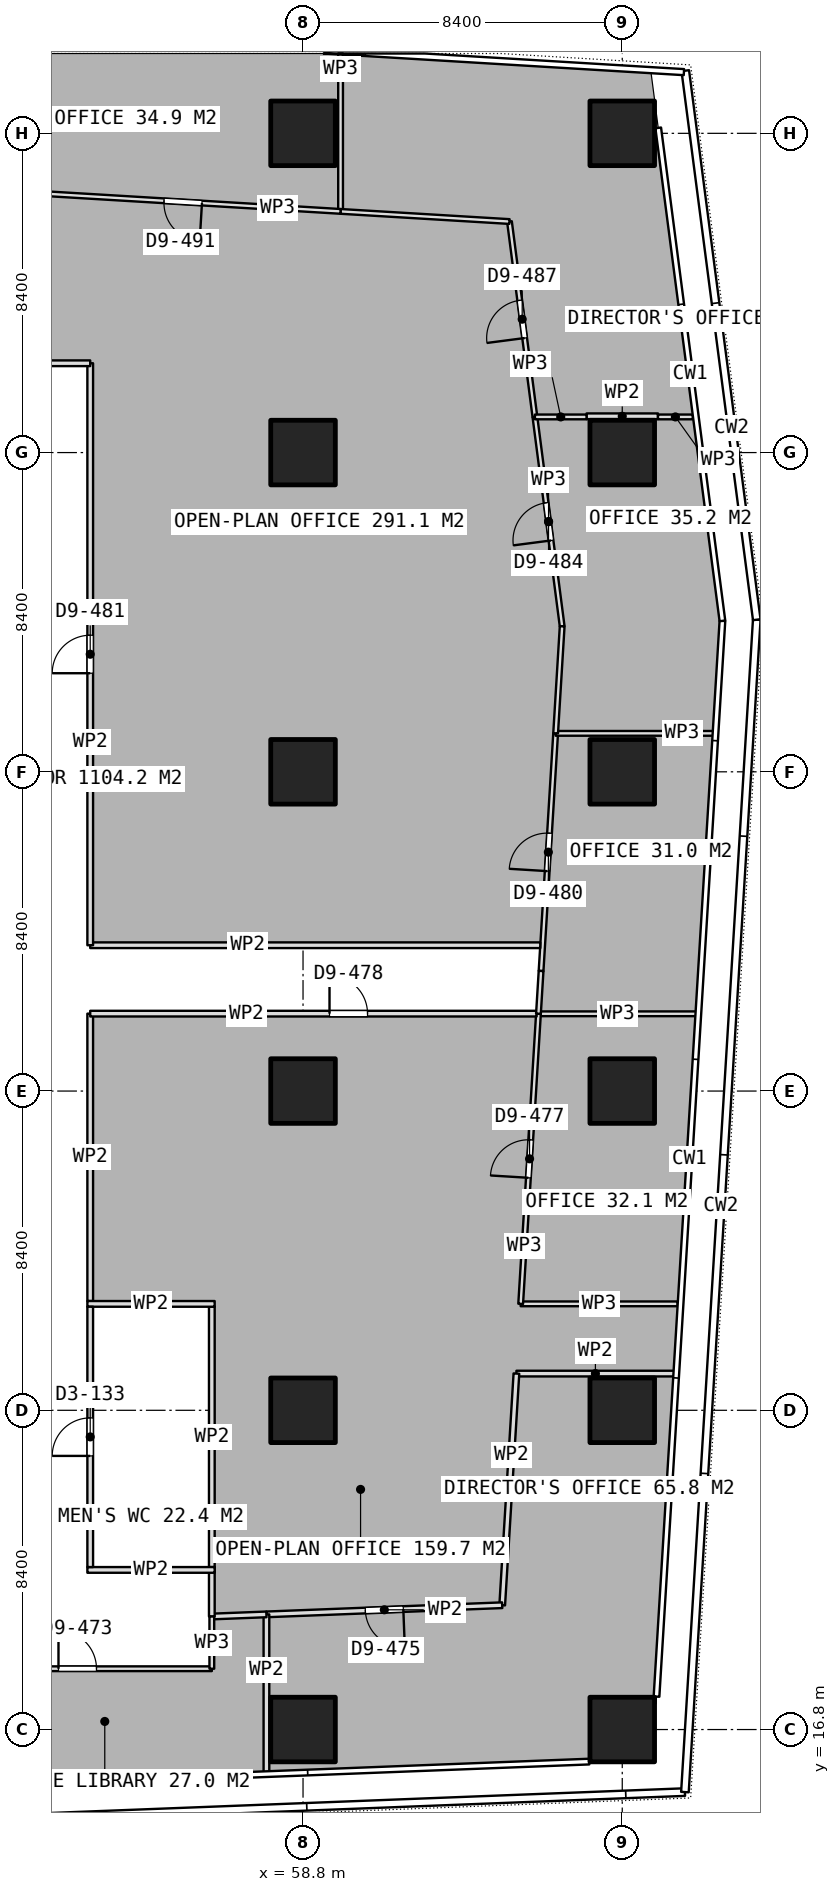
"""IFC4 building model, lengths in metres.
Left out: names, types, materials, properties, quantities, classifications, styles, units other than length and angle.
Written with IfcOpenShell. Run it as: python <this file> out.ifc"""

import sys

from ifc_helpers import new_model, si_unit, direction, frame, frame_2d, origin, origin_2d, place, context, subcontext, project, spatial, rectangle, extrude, element, fill, save


model = new_model("IFC4")
c1 = context("Model", 3, precision=1e-05, world=origin(), true_north=direction((0.0, 1.0)))
c2 = subcontext(c1, "Body", "Model", "MODEL_VIEW")
j1 = project(units=[si_unit("LENGTHUNIT", "METRE"), si_unit("PLANEANGLEUNIT", "RADIAN")], contexts=[c1])
p1 = place(None, origin())
s1 = spatial("IfcSite", under=j1, at=p1, CompositionType="ELEMENT")
p2 = place(p1, origin())
s2 = spatial("IfcBuilding", under=s1, at=p2, CompositionType="ELEMENT")
p3 = place(p2, frame((0.0, 0.0, 125.3)))
s3 = spatial("IfcBuildingStorey", under=s2, at=p3, CompositionType="ELEMENT", Elevation=125.3)
for number, where, z_axis, x_axis in (
    (1, (58.8, 16.8, 0.0), (0.0, 0.0, 1.0), (1.0, 0.0, 0.0)),
    (2, (58.8, 25.2, 0.0), (0.0, 0.0, 1.0), (1.0, 0.0, 0.0)),
    (3, (58.8, 33.6, 0.0), (0.0, 0.0, 1.0), (1.0, 0.0, 0.0)),
    (4, (58.8, 42.0, 0.0), (0.0, 0.0, 1.0), (1.0, 0.0, 0.0)),
    (5, (58.8, 50.4, 0.0), (0.0, 0.0, 1.0), (1.0, 0.0, 0.0)),
    (6, (58.8, 58.8, 0.0), (0.0, 0.0, 1.0), (1.0, 0.0, 0.0)),
    (7, (67.2, 16.8, 0.0), (0.0, 0.0, 1.0), (1.0, 0.0, 0.0)),
    (8, (67.2, 25.2, 0.0), (0.0, 0.0, 1.0), (1.0, 0.0, 0.0)),
    (9, (67.2, 33.6, 0.0), (0.0, 0.0, 1.0), (1.0, 0.0, 0.0)),
    (10, (67.2, 42.0, 0.0), (0.0, 0.0, 1.0), (1.0, 0.0, 0.0)),
    (11, (67.2, 50.4, 0.0), (0.0, 0.0, 1.0), (1.0, 0.0, 0.0)),
    (12, (67.2, 58.8, 0.0), (0.0, 0.0, 1.0), (1.0, 0.0, 0.0)),
):
    element("IfcColumn", number, at=place(p3, frame(where, z_axis=z_axis, x_axis=x_axis)), inside=s3, PredefinedType="COLUMN", context=c2, shape_type="SweptSolid", body=[
        extrude(rectangle(XDim=1.7, YDim=1.7, at=origin_2d()), origin(), (0.0, 0.0, 1.0), 3.75),
    ])
for number, where, z_axis, x_axis in (
    (13, (53.125, 21.0, 0.0), (0.0, 0.0, 1.0), (1.0, 0.0, 0.0)),
    (14, (53.125, 28.0, 0.0), (0.0, 0.0, 1.0), (1.0, 0.0, 0.0)),
):
    element("IfcWall", number, at=place(p3, frame(where, z_axis=z_axis, x_axis=x_axis)), inside=s3, PredefinedType="PARTITIONING", context=c2, shape_type="SweptSolid", body=[
        extrude(rectangle(XDim=3.35, YDim=0.15, at=frame_2d((1.675, 0.0))), origin(), (0.0, 0.0, 1.0), 3.5),
    ])
p4 = place(p3, frame((53.2, 21.075, 0.0), z_axis=(0.0, 0.0, 1.0), x_axis=(0.0, 1.0, 0.0)))
e15 = element("IfcWall", 15, at=p4, inside=s3, PredefinedType="PARTITIONING", context=c2, shape_type="SweptSolid", body=[
    extrude(rectangle(XDim=6.85, YDim=0.15, at=frame_2d((3.425, 0.0))), origin(), (0.0, 0.0, 1.0), 3.5),
])
p5 = place(p4, frame((2.925, 0.0, 0.0)))
e16 = element("IfcOpeningElement", 16, at=p5, cuts=e15, PredefinedType="OPENING", context=c2, shape_type="SweptSolid", body=[
    extrude(rectangle(XDim=1.0, YDim=2.1, at=frame_2d((0.5, 1.05))), frame((0.0, 0.085, 0.0), z_axis=(0.0, -1.0, 0.0), x_axis=(1.0, 0.0, 0.0)), (0.0, 0.0, 1.0), 0.17),
])
p6 = place(p3, frame((56.4, 21.075, 0.0), z_axis=(0.0, 0.0, 1.0), x_axis=(0.0, 1.0, 0.0)))
e17 = element("IfcWall", 17, at=p6, inside=s3, PredefinedType="PARTITIONING", context=c2, shape_type="SweptSolid", body=[
    extrude(rectangle(XDim=6.85, YDim=0.15, at=frame_2d((3.425, 0.0))), origin(), (0.0, 0.0, 1.0), 3.5),
])
p7 = place(p3, frame((64.995, 35.633, 0.0), z_axis=(0.0, 0.0, 1.0), x_axis=(1.0, 0.0, 0.0)))
e18 = element("IfcWall", 18, at=p7, inside=s3, PredefinedType="PARTITIONING", context=c2, shape_type="SweptSolid", body=[
    extrude(rectangle(XDim=4.157, YDim=0.125, at=frame_2d((2.079, 0.0))), origin(), (0.0, 0.0, 1.0), 3.5),
])
p8 = place(p3, frame((68.655, 28.001, 0.0), z_axis=(0.0, 0.0, 1.0), x_axis=(-1.0, 0.0, 0.0)))
e19 = element("IfcWall", 19, at=p8, inside=s3, PredefinedType="PARTITIONING", context=c2, shape_type="SweptSolid", body=[
    extrude(rectangle(XDim=4.128, YDim=0.125, at=frame_2d((2.064, 0.0))), origin(), (0.0, 0.0, 1.0), 3.5),
])
p9 = place(p3, frame((64.527, 28.001, 0.0), z_axis=(0.0, 0.0, 1.0), x_axis=(0.061207439092, 0.998125067013, 0.0)))
e20 = element("IfcWall", 20, at=p9, inside=s3, PredefinedType="PARTITIONING", context=c2, shape_type="SweptSolid", body=[
    extrude(rectangle(XDim=7.646, YDim=0.125, at=frame_2d((3.823, 0.0))), origin(), (0.0, 0.0, 1.0), 3.5),
])
p10 = place(p9, frame((3.323, 0.0, 0.0)))
e21 = element("IfcOpeningElement", 21, at=p10, cuts=e20, PredefinedType="OPENING", context=c2, shape_type="SweptSolid", body=[
    extrude(rectangle(XDim=1.0, YDim=2.1, at=frame_2d((0.5, 1.05))), frame((0.0, 0.073, 0.0), z_axis=(0.0, -1.0, 0.0), x_axis=(1.0, 0.0, 0.0)), (0.0, 0.0, 1.0), 0.145),
])
p11 = place(p3, frame((65.064, 36.76, 0.0), z_axis=(0.0, 0.0, 1.0), x_axis=(0.061155234725, 0.998128266941, 0.0)))
e22 = element("IfcWall", 22, at=p11, inside=s3, PredefinedType="PARTITIONING", context=c2, shape_type="SweptSolid", body=[
    extrude(rectangle(XDim=6.264, YDim=0.125, at=frame_2d((3.132, 0.0))), origin(), (0.0, 0.0, 1.0), 3.5),
])
p12 = place(p11, frame((2.632, 0.0, 0.0)))
e23 = element("IfcOpeningElement", 23, at=p12, cuts=e22, PredefinedType="OPENING", context=c2, shape_type="SweptSolid", body=[
    extrude(rectangle(XDim=1.0, YDim=2.1, at=frame_2d((0.5, 1.05))), frame((0.0, 0.073, 0.0), z_axis=(0.0, -1.0, 0.0), x_axis=(1.0, 0.0, 0.0)), (0.0, 0.0, 1.0), 0.145),
])
p13 = place(p3, frame((65.447, 43.012, 0.0), z_axis=(0.0, 0.0, 1.0), x_axis=(1.0, 0.0, 0.0)))
e24 = element("IfcWall", 24, at=p13, inside=s3, PredefinedType="PARTITIONING", context=c2, shape_type="SweptSolid", body=[
    extrude(rectangle(XDim=4.157, YDim=0.125, at=frame_2d((2.079, 0.0))), origin(), (0.0, 0.0, 1.0), 3.5),
])
p14 = place(p3, frame((64.995, 35.634, 0.0), z_axis=(0.0, 0.0, 1.0), x_axis=(0.061030858212, 0.998135879701, 0.0)))
e25 = element("IfcWall", 25, at=p14, inside=s3, PredefinedType="PARTITIONING", context=c2, shape_type="SweptSolid", body=[
    extrude(rectangle(XDim=1.128, YDim=0.125, at=frame_2d((0.564, 0.0))), origin(), (0.0, 0.0, 1.0), 3.5),
])
p15 = place(p3, frame((64.902, 51.338, 0.0), z_axis=(0.0, 0.0, 1.0), x_axis=(1.0, 0.0, 0.0)))
e26 = element("IfcWall", 26, at=p15, inside=s3, PredefinedType="PARTITIONING", context=c2, shape_type="SweptSolid", body=[
    extrude(rectangle(XDim=1.358, YDim=0.125, at=frame_2d((0.679, 0.0))), origin(), (0.0, 0.0, 1.0), 3.5),
])
p16 = place(p3, frame((68.14, 51.338, 0.0), z_axis=(0.0, 0.0, 1.0), x_axis=(1.0, 0.0, 0.0)))
e27 = element("IfcWall", 27, at=p16, inside=s3, PredefinedType="PARTITIONING", context=c2, shape_type="SweptSolid", body=[
    extrude(rectangle(XDim=0.917, YDim=0.125, at=frame_2d((0.458, 0.0))), origin(), (0.0, 0.0, 1.0), 3.5),
])
p17 = place(p3, frame((65.447, 43.013, 0.0), z_axis=(0.0, 0.0, 1.0), x_axis=(0.060944611384, 0.998141149509, 0.0)))
e28 = element("IfcWall", 28, at=p17, inside=s3, PredefinedType="PARTITIONING", context=c2, shape_type="SweptSolid", body=[
    extrude(rectangle(XDim=2.82, YDim=0.125, at=frame_2d((1.41, 0.0))), origin(), (0.0, 0.0, 1.0), 3.5),
])
p18 = place(p3, frame((65.619, 45.828, 0.0), z_axis=(0.0, 0.0, 1.0), x_axis=(-0.129002942223, 0.991644210843, 0.0)))
e29 = element("IfcWall", 29, at=p18, inside=s3, PredefinedType="PARTITIONING", context=c2, shape_type="SweptSolid", body=[
    extrude(rectangle(XDim=5.556, YDim=0.125, at=frame_2d((2.778, 0.0))), origin(), (0.0, 0.0, 1.0), 3.5),
])
p19 = place(p18, frame((2.278, 0.0, 0.0)))
e30 = element("IfcOpeningElement", 30, at=p19, cuts=e29, PredefinedType="OPENING", context=c2, shape_type="SweptSolid", body=[
    extrude(rectangle(XDim=1.0, YDim=2.1, at=frame_2d((0.5, 1.05))), frame((0.0, 0.073, 0.0), z_axis=(0.0, -1.0, 0.0), x_axis=(1.0, 0.0, 0.0)), (0.0, 0.0, 1.0), 0.145),
])
p20 = place(p3, frame((59.788, 56.746, 0.0), z_axis=(0.0, 0.0, 1.0), x_axis=(0.0, 1.0, 0.0)))
e31 = element("IfcWall", 31, at=p20, inside=s3, PredefinedType="PARTITIONING", context=c2, shape_type="SweptSolid", body=[
    extrude(rectangle(XDim=4.157, YDim=0.125, at=frame_2d((2.079, 0.0))), origin(), (0.0, 0.0, 1.0), 3.5),
])
p21 = place(p3, frame((64.902, 51.339, 0.0), z_axis=(0.0, 0.0, 1.0), x_axis=(-0.129290857756, 0.991606713421, 0.0)))
e32 = element("IfcWall", 32, at=p21, inside=s3, PredefinedType="PARTITIONING", context=c2, shape_type="SweptSolid", body=[
    extrude(rectangle(XDim=5.183, YDim=0.125, at=frame_2d((2.592, 0.0))), origin(), (0.0, 0.0, 1.0), 3.5),
])
p22 = place(p21, frame((2.092, 0.0, 0.0)))
e33 = element("IfcOpeningElement", 33, at=p22, cuts=e32, PredefinedType="OPENING", context=c2, shape_type="SweptSolid", body=[
    extrude(rectangle(XDim=1.0, YDim=2.1, at=frame_2d((0.5, 1.05))), frame((0.0, 0.073, 0.0), z_axis=(0.0, -1.0, 0.0), x_axis=(1.0, 0.0, 0.0)), (0.0, 0.0, 1.0), 0.145),
])
p23 = place(p3, frame((64.232, 56.479, 0.0), z_axis=(0.0, 0.0, 1.0), x_axis=(-0.998198676411, 0.059995019888, 0.0)))
e34 = element("IfcWall", 34, at=p23, inside=s3, PredefinedType="PARTITIONING", context=c2, shape_type="SweptSolid", body=[
    extrude(rectangle(XDim=4.452, YDim=0.125, at=frame_2d((2.226, 0.0))), origin(), (0.0, 0.0, 1.0), 3.5),
])
p24 = place(p3, frame((59.787, 56.746, 0.0), z_axis=(0.0, 0.0, 1.0), x_axis=(-0.99820280668, 0.05992626083, 0.0)))
e35 = element("IfcWall", 35, at=p24, inside=s3, PredefinedType="PARTITIONING", context=c2, shape_type="SweptSolid", body=[
    extrude(rectangle(XDim=8.307, YDim=0.125, at=frame_2d((4.153, 0.0))), origin(), (0.0, 0.0, 1.0), 3.5),
])
p25 = place(p24, frame((3.653, 0.0, 0.0)))
e36 = element("IfcOpeningElement", 36, at=p25, cuts=e35, PredefinedType="OPENING", context=c2, shape_type="SweptSolid", body=[
    extrude(rectangle(XDim=1.0, YDim=2.1, at=frame_2d((0.5, 1.05))), frame((0.0, 0.073, 0.0), z_axis=(0.0, -1.0, 0.0), x_axis=(1.0, 0.0, 0.0)), (0.0, 0.0, 1.0), 0.145),
])
p26 = place(p3, frame((66.26, 51.355, 0.0), z_axis=(0.0, 0.0, 1.0), x_axis=(1.0, 0.0, 0.0)))
e37 = element("IfcWall", 37, at=p26, inside=s3, PredefinedType="PARTITIONING", context=c2, shape_type="SweptSolid", body=[
    extrude(rectangle(XDim=1.88, YDim=0.15, at=frame_2d((0.94, 0.0))), origin(), (0.0, 0.0, 1.0), 3.5),
])
p27 = place(p3, frame((65.043, 37.437, 0.0), z_axis=(0.0, 0.0, 1.0), x_axis=(-1.0, 0.0, 0.0)))
e38 = element("IfcWall", 38, at=p27, inside=s3, PredefinedType="PARTITIONING", context=c2, shape_type="SweptSolid", body=[
    extrude(rectangle(XDim=11.843, YDim=0.15, at=frame_2d((5.921, 0.0))), origin(), (0.0, 0.0, 1.0), 3.5),
])
p28 = place(p3, frame((53.2, 37.437, 0.0), z_axis=(0.0, 0.0, 1.0), x_axis=(0.0, 1.0, 0.0)))
e39 = element("IfcWall", 39, at=p28, inside=s3, PredefinedType="PARTITIONING", context=c2, shape_type="SweptSolid", body=[
    extrude(rectangle(XDim=15.313, YDim=0.15, at=frame_2d((7.656, 0.0))), origin(), (0.0, 0.0, 1.0), 3.5),
])
p29 = place(p28, frame((7.157, 0.0, 0.0)))
e40 = element("IfcOpeningElement", 40, at=p29, cuts=e39, PredefinedType="OPENING", context=c2, shape_type="SweptSolid", body=[
    extrude(rectangle(XDim=1.0, YDim=2.1, at=frame_2d((0.5, 1.05))), frame((0.0, 0.085, 0.0), z_axis=(0.0, -1.0, 0.0), x_axis=(1.0, 0.0, 0.0)), (0.0, 0.0, 1.0), 0.17),
])
p30 = place(p3, frame((53.2, 52.75, 0.0), z_axis=(0.0, 0.0, 1.0), x_axis=(-1.0, 0.0, 0.0)))
e41 = element("IfcWall", 41, at=p30, inside=s3, PredefinedType="PARTITIONING", context=c2, shape_type="SweptSolid", body=[
    extrude(rectangle(XDim=12.8, YDim=0.15, at=frame_2d((6.4, 0.0))), origin(), (0.0, 0.0, 1.0), 3.5),
])
p31 = place(p3, frame((53.2, 28.075, 0.0), z_axis=(0.0, 0.0, 1.0), x_axis=(0.0, 1.0, 0.0)))
e42 = element("IfcWall", 42, at=p31, inside=s3, PredefinedType="PARTITIONING", context=c2, shape_type="SweptSolid", body=[
    extrude(rectangle(XDim=7.562, YDim=0.15, at=frame_2d((3.781, 0.0))), origin(), (0.0, 0.0, 1.0), 3.5),
])
p32 = place(p3, frame((53.2, 35.637, 0.0), z_axis=(0.0, 0.0, 1.0), x_axis=(1.0, 0.0, 0.0)))
e43 = element("IfcWall", 43, at=p32, inside=s3, PredefinedType="PARTITIONING", context=c2, shape_type="SweptSolid", body=[
    extrude(rectangle(XDim=11.746, YDim=0.15, at=frame_2d((5.873, 0.0))), origin(), (0.0, 0.0, 1.0), 3.5),
])
p33 = place(p32, frame((6.297, 0.0, 0.0)))
e44 = element("IfcOpeningElement", 44, at=p33, cuts=e43, PredefinedType="OPENING", context=c2, shape_type="SweptSolid", body=[
    extrude(rectangle(XDim=1.0, YDim=2.1, at=frame_2d((0.5, 1.05))), frame((0.0, 0.085, 0.0), z_axis=(0.0, -1.0, 0.0), x_axis=(1.0, 0.0, 0.0)), (0.0, 0.0, 1.0), 0.17),
])
p34 = place(p3, frame((68.572, 26.166, 0.0), z_axis=(0.0, 0.0, 1.0), x_axis=(-1.0, 0.0, 0.0)))
e45 = element("IfcWall", 45, at=p34, inside=s3, PredefinedType="PARTITIONING", context=c2, shape_type="SweptSolid", body=[
    extrude(rectangle(XDim=4.157, YDim=0.15, at=frame_2d((2.079, 0.0))), origin(), (0.0, 0.0, 1.0), 3.5),
])
p35 = place(p3, frame((64.415, 26.166, 0.0), z_axis=(0.0, 0.0, 1.0), x_axis=(-0.061250692479, -0.99812241367, 0.0)))
e46 = element("IfcWall", 46, at=p35, inside=s3, PredefinedType="PARTITIONING", context=c2, shape_type="SweptSolid", body=[
    extrude(rectangle(XDim=6.106, YDim=0.15, at=frame_2d((3.053, 0.0))), origin(), (0.0, 0.0, 1.0), 3.5),
])
p36 = place(p3, frame((64.041, 20.071, 0.0), z_axis=(0.0, 0.0, 1.0), x_axis=(-0.999246582692, -0.038810655482, 0.0)))
e47 = element("IfcWall", 47, at=p36, inside=s3, PredefinedType="PARTITIONING", context=c2, shape_type="SweptSolid", body=[
    extrude(rectangle(XDim=6.209, YDim=0.15, at=frame_2d((3.104, 0.0))), origin(), (0.0, 0.0, 1.0), 3.5),
])
p37 = place(p36, frame((2.604, 0.0, 0.0)))
e48 = element("IfcOpeningElement", 48, at=p37, cuts=e47, PredefinedType="OPENING", context=c2, shape_type="SweptSolid", body=[
    extrude(rectangle(XDim=1.0, YDim=2.1, at=frame_2d((0.5, 1.05))), frame((0.0, 0.085, 0.0), z_axis=(0.0, -1.0, 0.0), x_axis=(1.0, 0.0, 0.0)), (0.0, 0.0, 1.0), 0.17),
])
p38 = place(p3, frame((57.837, 19.83, 0.0), z_axis=(0.0, 0.0, 1.0), x_axis=(0.0, -1.0, 0.0)))
e49 = element("IfcWall", 49, at=p38, inside=s3, PredefinedType="PARTITIONING", context=c2, shape_type="SweptSolid", body=[
    extrude(rectangle(XDim=4.154, YDim=0.15, at=frame_2d((2.077, 0.0))), origin(), (0.0, 0.0, 1.0), 3.5),
])
p39 = place(p3, frame((57.836, 19.83, 0.0), z_axis=(0.0, 0.0, 1.0), x_axis=(-0.99923637883, -0.039072486761, 0.0)))
e50 = element("IfcWall", 50, at=p39, inside=s3, PredefinedType="PARTITIONING", context=c2, shape_type="SweptSolid", body=[
    extrude(rectangle(XDim=1.437, YDim=0.15, at=frame_2d((0.719, 0.0))), origin(), (0.0, 0.0, 1.0), 3.5),
])
p40 = place(p3, frame((56.4, 19.774, 0.0), z_axis=(0.0, 0.0, 1.0), x_axis=(0.0, 1.0, 0.0)))
e51 = element("IfcWall", 51, at=p40, inside=s3, PredefinedType="PARTITIONING", context=c2, shape_type="SweptSolid", body=[
    extrude(rectangle(XDim=1.301, YDim=0.15, at=frame_2d((0.65, 0.0))), origin(), (0.0, 0.0, 1.0), 3.5),
])
p41 = place(p3, frame((49.33, 18.4, 0.0), z_axis=(0.0, 0.0, 1.0), x_axis=(1.0, 0.0, 0.0)))
e52 = element("IfcWall", 52, at=p41, inside=s3, PredefinedType="PARTITIONING", context=c2, shape_type="SweptSolid", body=[
    extrude(rectangle(XDim=7.07, YDim=0.125, at=frame_2d((3.535, 0.0))), origin(), (0.0, 0.0, 1.0), 3.5),
])
p42 = place(p41, frame((3.035, 0.0, 0.0)))
e53 = element("IfcOpeningElement", 53, at=p42, cuts=e52, PredefinedType="OPENING", context=c2, shape_type="SweptSolid", body=[
    extrude(rectangle(XDim=1.0, YDim=2.1, at=frame_2d((0.5, 1.05))), frame((0.0, 0.073, 0.0), z_axis=(0.0, -1.0, 0.0), x_axis=(1.0, 0.0, 0.0)), (0.0, 0.0, 1.0), 0.145),
])
p43 = place(p3, frame((56.4, 18.4, 0.0), z_axis=(0.0, 0.0, 1.0), x_axis=(0.0, 1.0, 0.0)))
e54 = element("IfcWall", 54, at=p43, inside=s3, PredefinedType="PARTITIONING", context=c2, shape_type="SweptSolid", body=[
    extrude(rectangle(XDim=1.374, YDim=0.125, at=frame_2d((0.687, 0.0))), origin(), (0.0, 0.0, 1.0), 3.5),
])
p44 = place(p5, origin())
e55 = element("IfcDoor", 55, at=p44, inside=s3, OperationType="SINGLE_SWING_LEFT", PredefinedType="DOOR", context=c2, shape_type="SweptSolid", body=[
    extrude(rectangle(XDim=1.0, YDim=2.1, at=frame_2d((0.5, 1.05))), frame((0.0, 0.025, 0.0), z_axis=(0.0, -1.0, 0.0), x_axis=(1.0, 0.0, 0.0)), (0.0, 0.0, 1.0), 0.05),
])
fill(e16, e55)
p45 = place(p10, origin())
e56 = element("IfcDoor", 56, at=p45, inside=s3, OperationType="SINGLE_SWING_LEFT", PredefinedType="DOOR", context=c2, shape_type="SweptSolid", body=[
    extrude(rectangle(XDim=1.0, YDim=2.1, at=frame_2d((0.5, 1.05))), frame((0.0, 0.025, 0.0), z_axis=(0.0, -1.0, 0.0), x_axis=(1.0, 0.0, 0.0)), (0.0, 0.0, 1.0), 0.05),
])
fill(e21, e56)
p46 = place(p12, origin())
e57 = element("IfcDoor", 57, at=p46, inside=s3, OperationType="SINGLE_SWING_LEFT", PredefinedType="DOOR", context=c2, shape_type="SweptSolid", body=[
    extrude(rectangle(XDim=1.0, YDim=2.1, at=frame_2d((0.5, 1.05))), frame((0.0, 0.025, 0.0), z_axis=(0.0, -1.0, 0.0), x_axis=(1.0, 0.0, 0.0)), (0.0, 0.0, 1.0), 0.05),
])
fill(e23, e57)
p47 = place(p19, origin())
e58 = element("IfcDoor", 58, at=p47, inside=s3, OperationType="SINGLE_SWING_LEFT", PredefinedType="DOOR", context=c2, shape_type="SweptSolid", body=[
    extrude(rectangle(XDim=1.0, YDim=2.1, at=frame_2d((0.5, 1.05))), frame((0.0, 0.025, 0.0), z_axis=(0.0, -1.0, 0.0), x_axis=(1.0, 0.0, 0.0)), (0.0, 0.0, 1.0), 0.05),
])
fill(e30, e58)
p48 = place(p22, origin())
e59 = element("IfcDoor", 59, at=p48, inside=s3, OperationType="SINGLE_SWING_LEFT", PredefinedType="DOOR", context=c2, shape_type="SweptSolid", body=[
    extrude(rectangle(XDim=1.0, YDim=2.1, at=frame_2d((0.5, 1.05))), frame((0.0, 0.025, 0.0), z_axis=(0.0, -1.0, 0.0), x_axis=(1.0, 0.0, 0.0)), (0.0, 0.0, 1.0), 0.05),
])
fill(e33, e59)
p49 = place(p25, origin())
e60 = element("IfcDoor", 60, at=p49, inside=s3, OperationType="SINGLE_SWING_LEFT", PredefinedType="DOOR", context=c2, shape_type="SweptSolid", body=[
    extrude(rectangle(XDim=1.0, YDim=2.1, at=frame_2d((0.5, 1.05))), frame((0.0, 0.025, 0.0), z_axis=(0.0, -1.0, 0.0), x_axis=(1.0, 0.0, 0.0)), (0.0, 0.0, 1.0), 0.05),
])
fill(e36, e60)
p50 = place(p29, origin())
e61 = element("IfcDoor", 61, at=p50, inside=s3, OperationType="SINGLE_SWING_LEFT", PredefinedType="DOOR", context=c2, shape_type="SweptSolid", body=[
    extrude(rectangle(XDim=1.0, YDim=2.1, at=frame_2d((0.5, 1.05))), frame((0.0, 0.025, 0.0), z_axis=(0.0, -1.0, 0.0), x_axis=(1.0, 0.0, 0.0)), (0.0, 0.0, 1.0), 0.05),
])
fill(e40, e61)
p51 = place(p33, origin())
e62 = element("IfcDoor", 62, at=p51, inside=s3, OperationType="SINGLE_SWING_LEFT", PredefinedType="DOOR", context=c2, shape_type="SweptSolid", body=[
    extrude(rectangle(XDim=1.0, YDim=2.1, at=frame_2d((0.5, 1.05))), frame((0.0, 0.025, 0.0), z_axis=(0.0, -1.0, 0.0), x_axis=(1.0, 0.0, 0.0)), (0.0, 0.0, 1.0), 0.05),
])
fill(e44, e62)
p52 = place(p42, origin())
e63 = element("IfcDoor", 63, at=p52, inside=s3, OperationType="SINGLE_SWING_LEFT", PredefinedType="DOOR", context=c2, shape_type="SweptSolid", body=[
    extrude(rectangle(XDim=1.0, YDim=2.1, at=frame_2d((0.5, 1.05))), frame((0.0, 0.025, 0.0), z_axis=(0.0, -1.0, 0.0), x_axis=(1.0, 0.0, 0.0)), (0.0, 0.0, 1.0), 0.05),
])
fill(e53, e63)
p53 = place(p37, origin())
e64 = element("IfcDoor", 64, at=p53, inside=s3, OperationType="SINGLE_SWING_LEFT", PredefinedType="DOOR", context=c2, shape_type="SweptSolid", body=[
    extrude(rectangle(XDim=1.0, YDim=2.1, at=frame_2d((0.5, 1.05))), frame((0.0, 0.025, 0.0), z_axis=(0.0, -1.0, 0.0), x_axis=(1.0, 0.0, 0.0)), (0.0, 0.0, 1.0), 0.05),
])
fill(e48, e64)
save(model, sys.argv[1])
